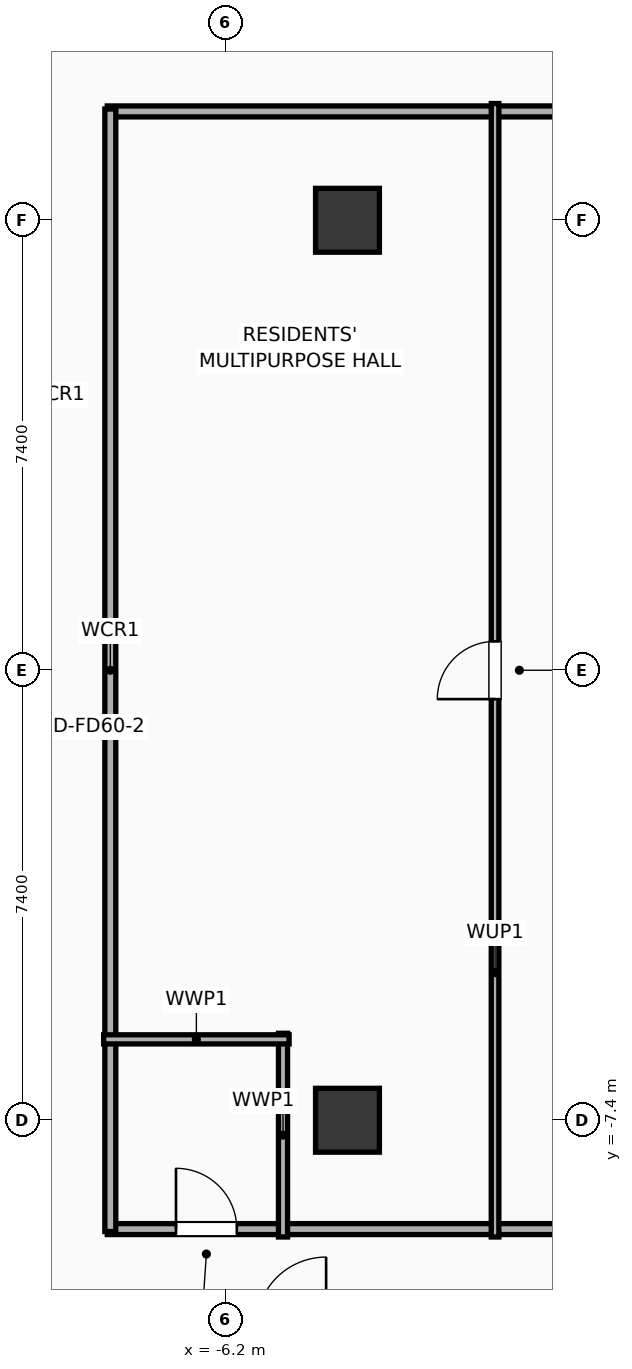
"""IFC4 building model, lengths in metres.
Left out: names, types, materials, properties, quantities, classifications, styles, units other than length and angle.
Written with IfcOpenShell. Run it as: python <this file> out.ifc"""

import sys

from ifc_helpers import new_model, si_unit, direction, frame, frame_2d, origin, origin_2d, place, context, subcontext, project, spatial, rectangle, extrude, element, fill, save


model = new_model("IFC4")
c1 = context("Model", 3, precision=1e-05, world=origin(), true_north=direction((0.0, 1.0)))
c2 = subcontext(c1, "Body", "Model", "MODEL_VIEW")
j1 = project(units=[si_unit("LENGTHUNIT", "METRE"), si_unit("PLANEANGLEUNIT", "RADIAN")], contexts=[c1])
p1 = place(None, origin())
s1 = spatial("IfcSite", under=j1, at=p1, CompositionType="ELEMENT")
p2 = place(p1, origin())
s2 = spatial("IfcBuilding", under=s1, at=p2, CompositionType="ELEMENT")
p3 = place(p2, frame((0.0, 0.0, 29.9)))
s3 = spatial("IfcBuildingStorey", under=s2, at=p3, CompositionType="ELEMENT", Elevation=29.9)
for number, where, z_axis, x_axis in (
    (1, (-4.2, -7.4, 0.0), (0.0, 0.0, 1.0), (1.0, 0.0, 0.0)),
    (2, (-4.2, 7.4, 0.0), (0.0, 0.0, 1.0), (1.0, 0.0, 0.0)),
):
    element("IfcColumn", number, at=place(p3, frame(where, z_axis=z_axis, x_axis=x_axis)), inside=s3, PredefinedType="COLUMN", context=c2, shape_type="SweptSolid", body=[
        extrude(rectangle(XDim=1.05, YDim=1.05, at=origin_2d()), origin(), (0.0, 0.0, 1.0), 3.9),
    ])
p4 = place(p3, frame((-8.15, 9.19, 0.0), z_axis=(0.0, 0.0, 1.0), x_axis=(1.0, 0.0, 0.0)))
e3 = element("IfcWall", 3, at=p4, inside=s3, PredefinedType="PARTITIONING", context=c2, shape_type="SweptSolid", body=[
    extrude(rectangle(XDim=16.3, YDim=0.18, at=frame_2d((8.15, 0.0))), origin(), (0.0, 0.0, 1.0), 3.65),
])
p5 = place(p4, frame((8.49, 0.0, 0.0)))
e4 = element("IfcOpeningElement", 4, at=p5, cuts=e3, PredefinedType="OPENING", context=c2, shape_type="SweptSolid", body=[
    extrude(rectangle(XDim=0.95, YDim=2.05, at=frame_2d((0.475, 1.025))), frame((0.0, 0.1, 0.0), z_axis=(0.0, -1.0, 0.0), x_axis=(1.0, 0.0, 0.0)), (0.0, 0.0, 1.0), 0.2),
])
p6 = place(p3, frame((-8.15, -9.19, 0.0), z_axis=(0.0, 0.0, 1.0), x_axis=(1.0, 0.0, 0.0)))
e5 = element("IfcWall", 5, at=p6, inside=s3, PredefinedType="PARTITIONING", context=c2, shape_type="SweptSolid", body=[
    extrude(rectangle(XDim=16.3, YDim=0.18, at=frame_2d((8.15, 0.0))), origin(), (0.0, 0.0, 1.0), 3.65),
])
p7 = place(p6, frame((1.13, 0.0, 0.0)))
e6 = element("IfcOpeningElement", 6, at=p7, cuts=e5, PredefinedType="OPENING", context=c2, shape_type="SweptSolid", body=[
    extrude(rectangle(XDim=1.0, YDim=2.05, at=frame_2d((0.5, 1.025))), frame((0.0, 0.1, 0.0), z_axis=(0.0, -1.0, 0.0), x_axis=(1.0, 0.0, 0.0)), (0.0, 0.0, 1.0), 0.2),
])
p8 = place(p6, frame((10.12, 0.0, 0.0)))
e7 = element("IfcOpeningElement", 7, at=p8, cuts=e5, PredefinedType="OPENING", context=c2, shape_type="SweptSolid", body=[
    extrude(rectangle(XDim=0.95, YDim=2.05, at=frame_2d((0.475, 1.025))), frame((0.0, 0.1, 0.0), z_axis=(0.0, -1.0, 0.0), x_axis=(1.0, 0.0, 0.0)), (0.0, 0.0, 1.0), 0.2),
])
p9 = place(p3, frame((-8.1, -9.23, 0.0), z_axis=(0.0, 0.0, 1.0), x_axis=(0.0, 1.0, 0.0)))
e8 = element("IfcWall", 8, at=p9, inside=s3, PredefinedType="PARTITIONING", context=c2, shape_type="SweptSolid", body=[
    extrude(rectangle(XDim=18.46, YDim=0.18, at=frame_2d((9.23, 0.0))), origin(), (0.0, 0.0, 1.0), 3.65),
])
p10 = place(p3, frame((-5.26, -9.32, 0.0), z_axis=(0.0, 0.0, 1.0), x_axis=(0.0, 1.0, 0.0)))
e9 = element("IfcWall", 9, at=p10, inside=s3, PredefinedType="PLUMBINGWALL", context=c2, shape_type="SweptSolid", body=[
    extrude(rectangle(XDim=3.35, YDim=0.15, at=frame_2d((1.675, 0.0))), origin(), (0.0, 0.0, 1.0), 3.65),
])
p11 = place(p3, frame((-8.21, -6.07, 0.0), z_axis=(0.0, 0.0, 1.0), x_axis=(1.0, 0.0, 0.0)))
e10 = element("IfcWall", 10, at=p11, inside=s3, PredefinedType="PLUMBINGWALL", context=c2, shape_type="SweptSolid", body=[
    extrude(rectangle(XDim=3.05, YDim=0.15, at=frame_2d((1.525, 0.0))), origin(), (0.0, 0.0, 1.0), 3.65),
])
p12 = place(p3, frame((-1.773, -9.32, 0.0), z_axis=(0.0, 0.0, 1.0), x_axis=(0.0, 1.0, 0.0)))
e11 = element("IfcWall", 11, at=p12, inside=s3, PredefinedType="PARTITIONING", context=c2, shape_type="SweptSolid", body=[
    extrude(rectangle(XDim=18.64, YDim=0.125, at=frame_2d((9.32, 0.0))), origin(), (0.0, 0.0, 1.0), 3.65),
])
p13 = place(p12, frame((8.845, 0.0, 0.0)))
e12 = element("IfcOpeningElement", 12, at=p13, cuts=e11, PredefinedType="OPENING", context=c2, shape_type="SweptSolid", body=[
    extrude(rectangle(XDim=0.95, YDim=2.05, at=frame_2d((0.475, 1.025))), frame((0.0, 0.073, 0.0), z_axis=(0.0, -1.0, 0.0), x_axis=(1.0, 0.0, 0.0)), (0.0, 0.0, 1.0), 0.145),
])
p14 = place(p7, origin())
e13 = element("IfcDoor", 13, at=p14, inside=s3, OperationType="SINGLE_SWING_LEFT", PredefinedType="DOOR", context=c2, shape_type="SweptSolid", body=[
    extrude(rectangle(XDim=1.0, YDim=2.05, at=frame_2d((0.5, 1.025))), frame((0.0, 0.025, 0.0), z_axis=(0.0, -1.0, 0.0), x_axis=(1.0, 0.0, 0.0)), (0.0, 0.0, 1.0), 0.05),
])
fill(e6, e13)
p15 = place(p13, origin())
e14 = element("IfcDoor", 14, at=p15, inside=s3, OperationType="SINGLE_SWING_LEFT", PredefinedType="DOOR", context=c2, shape_type="SweptSolid", body=[
    extrude(rectangle(XDim=0.95, YDim=2.05, at=frame_2d((0.475, 1.025))), frame((0.0, 0.025, 0.0), z_axis=(0.0, -1.0, 0.0), x_axis=(1.0, 0.0, 0.0)), (0.0, 0.0, 1.0), 0.05),
])
fill(e12, e14)
save(model, sys.argv[1])
